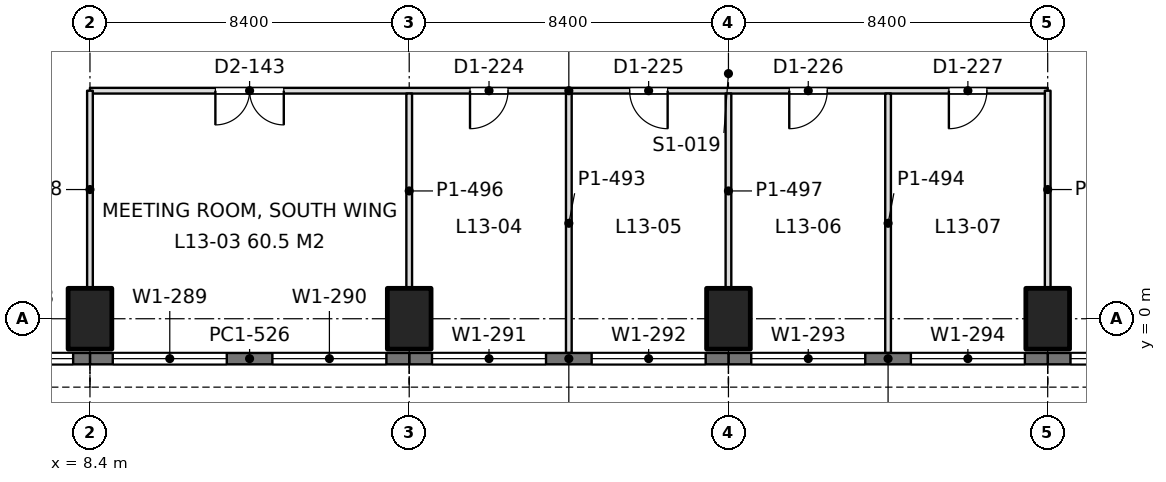
"""IFC4 building model, lengths in metres.
Left out: names, types, materials, properties, quantities, classifications, styles, units other than length and angle.
Written with IfcOpenShell. Run it as: python <this file> out.ifc"""

import sys

from ifc_helpers import new_model, si_unit, direction, frame, frame_2d, origin, origin_2d, place, context, subcontext, project, spatial, rectangle, extrude, element, fill, save


model = new_model("IFC4")
c1 = context("Model", 3, precision=1e-05, world=origin(), true_north=direction((0.0, 1.0)))
c2 = subcontext(c1, "Body", "Model", "MODEL_VIEW")
j1 = project(units=[si_unit("LENGTHUNIT", "METRE"), si_unit("PLANEANGLEUNIT", "RADIAN")], contexts=[c1])
p1 = place(None, origin())
s1 = spatial("IfcSite", under=j1, at=p1, CompositionType="ELEMENT")
p2 = place(p1, origin())
s2 = spatial("IfcBuilding", under=s1, at=p2, CompositionType="ELEMENT")
p3 = place(p2, frame((0.0, 0.0, 59.4)))
s3 = spatial("IfcBuildingStorey", under=s2, at=p3, CompositionType="ELEMENT", Elevation=59.4)
for number, where, z_axis, x_axis in (
    (1, (8.4, 0.0, 0.0), (0.0, 0.0, 1.0), (1.0, 0.0, 0.0)),
    (2, (16.8, 0.0, 0.0), (0.0, 0.0, 1.0), (1.0, 0.0, 0.0)),
    (3, (25.2, 0.0, 0.0), (0.0, 0.0, 1.0), (1.0, 0.0, 0.0)),
    (4, (33.6, 0.0, 0.0), (0.0, 0.0, 1.0), (1.0, 0.0, 0.0)),
):
    element("IfcColumn", number, at=place(p3, frame(where, z_axis=z_axis, x_axis=x_axis)), inside=s3, PredefinedType="COLUMN", context=c2, shape_type="SweptSolid", body=[
        extrude(rectangle(XDim=1.15, YDim=1.6, at=origin_2d()), origin(), (0.0, 0.0, 1.0), 4.5),
    ])
p4 = place(p3, frame((42.0, -1.05, 0.0), z_axis=(0.0, 0.0, 1.0), x_axis=(-1.0, 0.0, 0.0)))
e5 = element("IfcWall", 5, at=p4, inside=s3, PredefinedType="SOLIDWALL", context=c2, shape_type="SweptSolid", body=[
    extrude(rectangle(XDim=8.4, YDim=0.3, at=frame_2d((4.2, 0.0))), origin(), (0.0, 0.0, 1.0), 4.34),
])
p5 = place(p4, frame((0.6, 0.0, 0.9)))
e6 = element("IfcOpeningElement", 6, at=p5, cuts=e5, PredefinedType="OPENING", context=c2, shape_type="SweptSolid", body=[
    extrude(rectangle(XDim=3.0, YDim=1.9, at=frame_2d((1.5, 0.95))), frame((0.0, 0.16, 0.0), z_axis=(0.0, -1.0, 0.0), x_axis=(1.0, 0.0, 0.0)), (0.0, 0.0, 1.0), 0.32),
])
p6 = place(p4, frame((4.8, 0.0, 0.9)))
e7 = element("IfcOpeningElement", 7, at=p6, cuts=e5, PredefinedType="OPENING", context=c2, shape_type="SweptSolid", body=[
    extrude(rectangle(XDim=3.0, YDim=1.9, at=frame_2d((1.5, 0.95))), frame((0.0, 0.16, 0.0), z_axis=(0.0, -1.0, 0.0), x_axis=(1.0, 0.0, 0.0)), (0.0, 0.0, 1.0), 0.32),
])
p7 = place(p3, frame((33.6, -1.05, 0.0), z_axis=(0.0, 0.0, 1.0), x_axis=(-1.0, 0.0, 0.0)))
e8 = element("IfcWall", 8, at=p7, inside=s3, PredefinedType="SOLIDWALL", context=c2, shape_type="SweptSolid", body=[
    extrude(rectangle(XDim=8.4, YDim=0.3, at=frame_2d((4.2, 0.0))), origin(), (0.0, 0.0, 1.0), 4.34),
])
p8 = place(p7, frame((0.6, 0.0, 0.9)))
e9 = element("IfcOpeningElement", 9, at=p8, cuts=e8, PredefinedType="OPENING", context=c2, shape_type="SweptSolid", body=[
    extrude(rectangle(XDim=3.0, YDim=1.9, at=frame_2d((1.5, 0.95))), frame((0.0, 0.16, 0.0), z_axis=(0.0, -1.0, 0.0), x_axis=(1.0, 0.0, 0.0)), (0.0, 0.0, 1.0), 0.32),
])
p9 = place(p7, frame((4.8, 0.0, 0.9)))
e10 = element("IfcOpeningElement", 10, at=p9, cuts=e8, PredefinedType="OPENING", context=c2, shape_type="SweptSolid", body=[
    extrude(rectangle(XDim=3.0, YDim=1.9, at=frame_2d((1.5, 0.95))), frame((0.0, 0.16, 0.0), z_axis=(0.0, -1.0, 0.0), x_axis=(1.0, 0.0, 0.0)), (0.0, 0.0, 1.0), 0.32),
])
p10 = place(p3, frame((25.2, -1.05, 0.0), z_axis=(0.0, 0.0, 1.0), x_axis=(-1.0, 0.0, 0.0)))
e11 = element("IfcWall", 11, at=p10, inside=s3, PredefinedType="SOLIDWALL", context=c2, shape_type="SweptSolid", body=[
    extrude(rectangle(XDim=8.4, YDim=0.3, at=frame_2d((4.2, 0.0))), origin(), (0.0, 0.0, 1.0), 4.34),
])
p11 = place(p10, frame((0.6, 0.0, 0.9)))
e12 = element("IfcOpeningElement", 12, at=p11, cuts=e11, PredefinedType="OPENING", context=c2, shape_type="SweptSolid", body=[
    extrude(rectangle(XDim=3.0, YDim=1.9, at=frame_2d((1.5, 0.95))), frame((0.0, 0.16, 0.0), z_axis=(0.0, -1.0, 0.0), x_axis=(1.0, 0.0, 0.0)), (0.0, 0.0, 1.0), 0.32),
])
p12 = place(p10, frame((4.8, 0.0, 0.9)))
e13 = element("IfcOpeningElement", 13, at=p12, cuts=e11, PredefinedType="OPENING", context=c2, shape_type="SweptSolid", body=[
    extrude(rectangle(XDim=3.0, YDim=1.9, at=frame_2d((1.5, 0.95))), frame((0.0, 0.16, 0.0), z_axis=(0.0, -1.0, 0.0), x_axis=(1.0, 0.0, 0.0)), (0.0, 0.0, 1.0), 0.32),
])
p13 = place(p3, frame((16.8, -1.05, 0.0), z_axis=(0.0, 0.0, 1.0), x_axis=(-1.0, 0.0, 0.0)))
e14 = element("IfcWall", 14, at=p13, inside=s3, PredefinedType="SOLIDWALL", context=c2, shape_type="SweptSolid", body=[
    extrude(rectangle(XDim=8.4, YDim=0.3, at=frame_2d((4.2, 0.0))), origin(), (0.0, 0.0, 1.0), 4.34),
])
p14 = place(p13, frame((0.6, 0.0, 0.9)))
e15 = element("IfcOpeningElement", 15, at=p14, cuts=e14, PredefinedType="OPENING", context=c2, shape_type="SweptSolid", body=[
    extrude(rectangle(XDim=3.0, YDim=1.9, at=frame_2d((1.5, 0.95))), frame((0.0, 0.16, 0.0), z_axis=(0.0, -1.0, 0.0), x_axis=(1.0, 0.0, 0.0)), (0.0, 0.0, 1.0), 0.32),
])
p15 = place(p13, frame((4.8, 0.0, 0.9)))
e16 = element("IfcOpeningElement", 16, at=p15, cuts=e14, PredefinedType="OPENING", context=c2, shape_type="SweptSolid", body=[
    extrude(rectangle(XDim=3.0, YDim=1.9, at=frame_2d((1.5, 0.95))), frame((0.0, 0.16, 0.0), z_axis=(0.0, -1.0, 0.0), x_axis=(1.0, 0.0, 0.0)), (0.0, 0.0, 1.0), 0.32),
])
p16 = place(p3, frame((8.4, -1.05, 0.0), z_axis=(0.0, 0.0, 1.0), x_axis=(-1.0, 0.0, 0.0)))
e17 = element("IfcWall", 17, at=p16, inside=s3, PredefinedType="SOLIDWALL", context=c2, shape_type="SweptSolid", body=[
    extrude(rectangle(XDim=8.085, YDim=0.3, at=frame_2d((4.042, 0.0))), origin(), (0.0, 0.0, 1.0), 4.34),
])
p17 = place(p16, frame((0.443, 0.0, 0.9)))
e18 = element("IfcOpeningElement", 18, at=p17, cuts=e17, PredefinedType="OPENING", context=c2, shape_type="SweptSolid", body=[
    extrude(rectangle(XDim=3.0, YDim=1.9, at=frame_2d((1.5, 0.95))), frame((0.0, 0.16, 0.0), z_axis=(0.0, -1.0, 0.0), x_axis=(1.0, 0.0, 0.0)), (0.0, 0.0, 1.0), 0.32),
])
p18 = place(p16, frame((4.643, 0.0, 0.9)))
e19 = element("IfcOpeningElement", 19, at=p18, cuts=e17, PredefinedType="OPENING", context=c2, shape_type="SweptSolid", body=[
    extrude(rectangle(XDim=3.0, YDim=1.9, at=frame_2d((1.5, 0.95))), frame((0.0, 0.16, 0.0), z_axis=(0.0, -1.0, 0.0), x_axis=(1.0, 0.0, 0.0)), (0.0, 0.0, 1.0), 0.32),
])
p19 = place(p3, frame((8.4, 6.0, 0.0), z_axis=(0.0, 0.0, 1.0), x_axis=(1.0, 0.0, 0.0)))
e20 = element("IfcWall", 20, at=p19, inside=s3, PredefinedType="PARTITIONING", context=c2, shape_type="SweptSolid", body=[
    extrude(rectangle(XDim=25.2, YDim=0.15, at=frame_2d((12.6, 0.0))), origin(), (0.0, 0.0, 1.0), 3.74),
])
p20 = place(p19, frame((3.3, 0.0, 0.0)))
e21 = element("IfcOpeningElement", 21, at=p20, cuts=e20, PredefinedType="OPENING", context=c2, shape_type="SweptSolid", body=[
    extrude(rectangle(XDim=1.8, YDim=2.2, at=frame_2d((0.9, 1.1))), frame((0.0, 0.085, 0.0), z_axis=(0.0, -1.0, 0.0), x_axis=(1.0, 0.0, 0.0)), (0.0, 0.0, 1.0), 0.17),
])
p21 = place(p19, frame((10.0, 0.0, 0.0)))
e22 = element("IfcOpeningElement", 22, at=p21, cuts=e20, PredefinedType="OPENING", context=c2, shape_type="SweptSolid", body=[
    extrude(rectangle(XDim=1.0, YDim=2.2, at=frame_2d((0.5, 1.1))), frame((0.0, 0.085, 0.0), z_axis=(0.0, -1.0, 0.0), x_axis=(1.0, 0.0, 0.0)), (0.0, 0.0, 1.0), 0.17),
])
p22 = place(p19, frame((14.2, 0.0, 0.0)))
e23 = element("IfcOpeningElement", 23, at=p22, cuts=e20, PredefinedType="OPENING", context=c2, shape_type="SweptSolid", body=[
    extrude(rectangle(XDim=1.0, YDim=2.2, at=frame_2d((0.5, 1.1))), frame((0.0, 0.085, 0.0), z_axis=(0.0, -1.0, 0.0), x_axis=(1.0, 0.0, 0.0)), (0.0, 0.0, 1.0), 0.17),
])
p23 = place(p19, frame((18.4, 0.0, 0.0)))
e24 = element("IfcOpeningElement", 24, at=p23, cuts=e20, PredefinedType="OPENING", context=c2, shape_type="SweptSolid", body=[
    extrude(rectangle(XDim=1.0, YDim=2.2, at=frame_2d((0.5, 1.1))), frame((0.0, 0.085, 0.0), z_axis=(0.0, -1.0, 0.0), x_axis=(1.0, 0.0, 0.0)), (0.0, 0.0, 1.0), 0.17),
])
p24 = place(p19, frame((22.6, 0.0, 0.0)))
e25 = element("IfcOpeningElement", 25, at=p24, cuts=e20, PredefinedType="OPENING", context=c2, shape_type="SweptSolid", body=[
    extrude(rectangle(XDim=1.0, YDim=2.2, at=frame_2d((0.5, 1.1))), frame((0.0, 0.085, 0.0), z_axis=(0.0, -1.0, 0.0), x_axis=(1.0, 0.0, 0.0)), (0.0, 0.0, 1.0), 0.17),
])
p25 = place(p3, frame((8.4, 0.799, 0.0), z_axis=(0.0, 0.0, 1.0), x_axis=(0.0, 1.0, 0.0)))
e26 = element("IfcWall", 26, at=p25, inside=s3, PredefinedType="PARTITIONING", context=c2, shape_type="SweptSolid", body=[
    extrude(rectangle(XDim=5.201, YDim=0.15, at=frame_2d((2.601, 0.0))), origin(), (0.0, 0.0, 1.0), 3.74),
])
p26 = place(p3, frame((16.8, 0.799, 0.0), z_axis=(0.0, 0.0, 1.0), x_axis=(0.0, 1.0, 0.0)))
e27 = element("IfcWall", 27, at=p26, inside=s3, PredefinedType="PARTITIONING", context=c2, shape_type="SweptSolid", body=[
    extrude(rectangle(XDim=5.127, YDim=0.15, at=frame_2d((2.563, 0.0))), origin(), (0.0, 0.0, 1.0), 3.74),
])
p27 = place(p3, frame((21.0, -0.902, 0.0), z_axis=(0.0, 0.0, 1.0), x_axis=(0.0, 1.0, 0.0)))
e28 = element("IfcWall", 28, at=p27, inside=s3, PredefinedType="PARTITIONING", context=c2, shape_type="SweptSolid", body=[
    extrude(rectangle(XDim=6.828, YDim=0.15, at=frame_2d((3.414, 0.0))), origin(), (0.0, 0.0, 1.0), 3.84),
])
p28 = place(p3, frame((25.2, 0.799, 0.0), z_axis=(0.0, 0.0, 1.0), x_axis=(0.0, 1.0, 0.0)))
e29 = element("IfcWall", 29, at=p28, inside=s3, PredefinedType="PARTITIONING", context=c2, shape_type="SweptSolid", body=[
    extrude(rectangle(XDim=5.127, YDim=0.15, at=frame_2d((2.563, 0.0))), origin(), (0.0, 0.0, 1.0), 3.74),
])
p29 = place(p3, frame((29.4, -0.902, 0.0), z_axis=(0.0, 0.0, 1.0), x_axis=(0.0, 1.0, 0.0)))
e30 = element("IfcWall", 30, at=p29, inside=s3, PredefinedType="PARTITIONING", context=c2, shape_type="SweptSolid", body=[
    extrude(rectangle(XDim=6.828, YDim=0.15, at=frame_2d((3.414, 0.0))), origin(), (0.0, 0.0, 1.0), 3.84),
])
p30 = place(p3, frame((33.6, 0.799, 0.0), z_axis=(0.0, 0.0, 1.0), x_axis=(0.0, 1.0, 0.0)))
e31 = element("IfcWall", 31, at=p30, inside=s3, PredefinedType="PARTITIONING", context=c2, shape_type="SweptSolid", body=[
    extrude(rectangle(XDim=5.201, YDim=0.15, at=frame_2d((2.601, 0.0))), origin(), (0.0, 0.0, 1.0), 3.74),
])
p31 = place(p6, origin())
e32 = element("IfcWindow", 32, at=p31, inside=s3, PartitioningType="SINGLE_PANEL", PredefinedType="WINDOW", context=c2, shape_type="SweptSolid", body=[
    extrude(rectangle(XDim=3.0, YDim=1.9, at=frame_2d((1.5, 0.95))), frame((0.0, 0.03, 0.0), z_axis=(0.0, -1.0, 0.0), x_axis=(1.0, 0.0, 0.0)), (0.0, 0.0, 1.0), 0.06),
])
fill(e7, e32)
p32 = place(p8, origin())
e33 = element("IfcWindow", 33, at=p32, inside=s3, PartitioningType="SINGLE_PANEL", PredefinedType="WINDOW", context=c2, shape_type="SweptSolid", body=[
    extrude(rectangle(XDim=3.0, YDim=1.9, at=frame_2d((1.5, 0.95))), frame((0.0, 0.03, 0.0), z_axis=(0.0, -1.0, 0.0), x_axis=(1.0, 0.0, 0.0)), (0.0, 0.0, 1.0), 0.06),
])
fill(e9, e33)
p33 = place(p9, origin())
e34 = element("IfcWindow", 34, at=p33, inside=s3, PartitioningType="SINGLE_PANEL", PredefinedType="WINDOW", context=c2, shape_type="SweptSolid", body=[
    extrude(rectangle(XDim=3.0, YDim=1.9, at=frame_2d((1.5, 0.95))), frame((0.0, 0.03, 0.0), z_axis=(0.0, -1.0, 0.0), x_axis=(1.0, 0.0, 0.0)), (0.0, 0.0, 1.0), 0.06),
])
fill(e10, e34)
p34 = place(p11, origin())
e35 = element("IfcWindow", 35, at=p34, inside=s3, PartitioningType="SINGLE_PANEL", PredefinedType="WINDOW", context=c2, shape_type="SweptSolid", body=[
    extrude(rectangle(XDim=3.0, YDim=1.9, at=frame_2d((1.5, 0.95))), frame((0.0, 0.03, 0.0), z_axis=(0.0, -1.0, 0.0), x_axis=(1.0, 0.0, 0.0)), (0.0, 0.0, 1.0), 0.06),
])
fill(e12, e35)
p35 = place(p12, origin())
e36 = element("IfcWindow", 36, at=p35, inside=s3, PartitioningType="SINGLE_PANEL", PredefinedType="WINDOW", context=c2, shape_type="SweptSolid", body=[
    extrude(rectangle(XDim=3.0, YDim=1.9, at=frame_2d((1.5, 0.95))), frame((0.0, 0.03, 0.0), z_axis=(0.0, -1.0, 0.0), x_axis=(1.0, 0.0, 0.0)), (0.0, 0.0, 1.0), 0.06),
])
fill(e13, e36)
p36 = place(p14, origin())
e37 = element("IfcWindow", 37, at=p36, inside=s3, PartitioningType="SINGLE_PANEL", PredefinedType="WINDOW", context=c2, shape_type="SweptSolid", body=[
    extrude(rectangle(XDim=3.0, YDim=1.9, at=frame_2d((1.5, 0.95))), frame((0.0, 0.03, 0.0), z_axis=(0.0, -1.0, 0.0), x_axis=(1.0, 0.0, 0.0)), (0.0, 0.0, 1.0), 0.06),
])
fill(e15, e37)
p37 = place(p15, origin())
e38 = element("IfcWindow", 38, at=p37, inside=s3, PartitioningType="SINGLE_PANEL", PredefinedType="WINDOW", context=c2, shape_type="SweptSolid", body=[
    extrude(rectangle(XDim=3.0, YDim=1.9, at=frame_2d((1.5, 0.95))), frame((0.0, 0.03, 0.0), z_axis=(0.0, -1.0, 0.0), x_axis=(1.0, 0.0, 0.0)), (0.0, 0.0, 1.0), 0.06),
])
fill(e16, e38)
p38 = place(p17, origin())
e39 = element("IfcWindow", 39, at=p38, inside=s3, PartitioningType="SINGLE_PANEL", PredefinedType="WINDOW", context=c2, shape_type="SweptSolid", body=[
    extrude(rectangle(XDim=3.0, YDim=1.9, at=frame_2d((1.5, 0.95))), frame((0.0, 0.03, 0.0), z_axis=(0.0, -1.0, 0.0), x_axis=(1.0, 0.0, 0.0)), (0.0, 0.0, 1.0), 0.06),
])
fill(e18, e39)
p39 = place(p20, frame((1.8, 0.0, 0.0), z_axis=(0.0, 0.0, 1.0), x_axis=(-1.0, 0.0, 0.0)))
e40 = element("IfcDoor", 40, at=p39, inside=s3, OperationType="DOUBLE_DOOR_SINGLE_SWING", PredefinedType="DOOR", context=c2, shape_type="SweptSolid", body=[
    extrude(rectangle(XDim=1.8, YDim=2.2, at=frame_2d((0.9, 1.1))), frame((0.0, 0.025, 0.0), z_axis=(0.0, -1.0, 0.0), x_axis=(1.0, 0.0, 0.0)), (0.0, 0.0, 1.0), 0.05),
])
fill(e21, e40)
p40 = place(p21, frame((1.0, 0.0, 0.0), z_axis=(0.0, 0.0, 1.0), x_axis=(-1.0, 0.0, 0.0)))
e41 = element("IfcDoor", 41, at=p40, inside=s3, OperationType="SINGLE_SWING_RIGHT", PredefinedType="DOOR", context=c2, shape_type="SweptSolid", body=[
    extrude(rectangle(XDim=1.0, YDim=2.2, at=frame_2d((0.5, 1.1))), frame((0.0, 0.025, 0.0), z_axis=(0.0, -1.0, 0.0), x_axis=(1.0, 0.0, 0.0)), (0.0, 0.0, 1.0), 0.05),
])
fill(e22, e41)
p41 = place(p22, frame((1.0, 0.0, 0.0), z_axis=(0.0, 0.0, 1.0), x_axis=(-1.0, 0.0, 0.0)))
e42 = element("IfcDoor", 42, at=p41, inside=s3, OperationType="SINGLE_SWING_LEFT", PredefinedType="DOOR", context=c2, shape_type="SweptSolid", body=[
    extrude(rectangle(XDim=1.0, YDim=2.2, at=frame_2d((0.5, 1.1))), frame((0.0, 0.025, 0.0), z_axis=(0.0, -1.0, 0.0), x_axis=(1.0, 0.0, 0.0)), (0.0, 0.0, 1.0), 0.05),
])
fill(e23, e42)
p42 = place(p23, frame((1.0, 0.0, 0.0), z_axis=(0.0, 0.0, 1.0), x_axis=(-1.0, 0.0, 0.0)))
e43 = element("IfcDoor", 43, at=p42, inside=s3, OperationType="SINGLE_SWING_RIGHT", PredefinedType="DOOR", context=c2, shape_type="SweptSolid", body=[
    extrude(rectangle(XDim=1.0, YDim=2.2, at=frame_2d((0.5, 1.1))), frame((0.0, 0.025, 0.0), z_axis=(0.0, -1.0, 0.0), x_axis=(1.0, 0.0, 0.0)), (0.0, 0.0, 1.0), 0.05),
])
fill(e24, e43)
p43 = place(p24, frame((1.0, 0.0, 0.0), z_axis=(0.0, 0.0, 1.0), x_axis=(-1.0, 0.0, 0.0)))
e44 = element("IfcDoor", 44, at=p43, inside=s3, OperationType="SINGLE_SWING_RIGHT", PredefinedType="DOOR", context=c2, shape_type="SweptSolid", body=[
    extrude(rectangle(XDim=1.0, YDim=2.2, at=frame_2d((0.5, 1.1))), frame((0.0, 0.025, 0.0), z_axis=(0.0, -1.0, 0.0), x_axis=(1.0, 0.0, 0.0)), (0.0, 0.0, 1.0), 0.05),
])
fill(e25, e44)
save(model, sys.argv[1])
